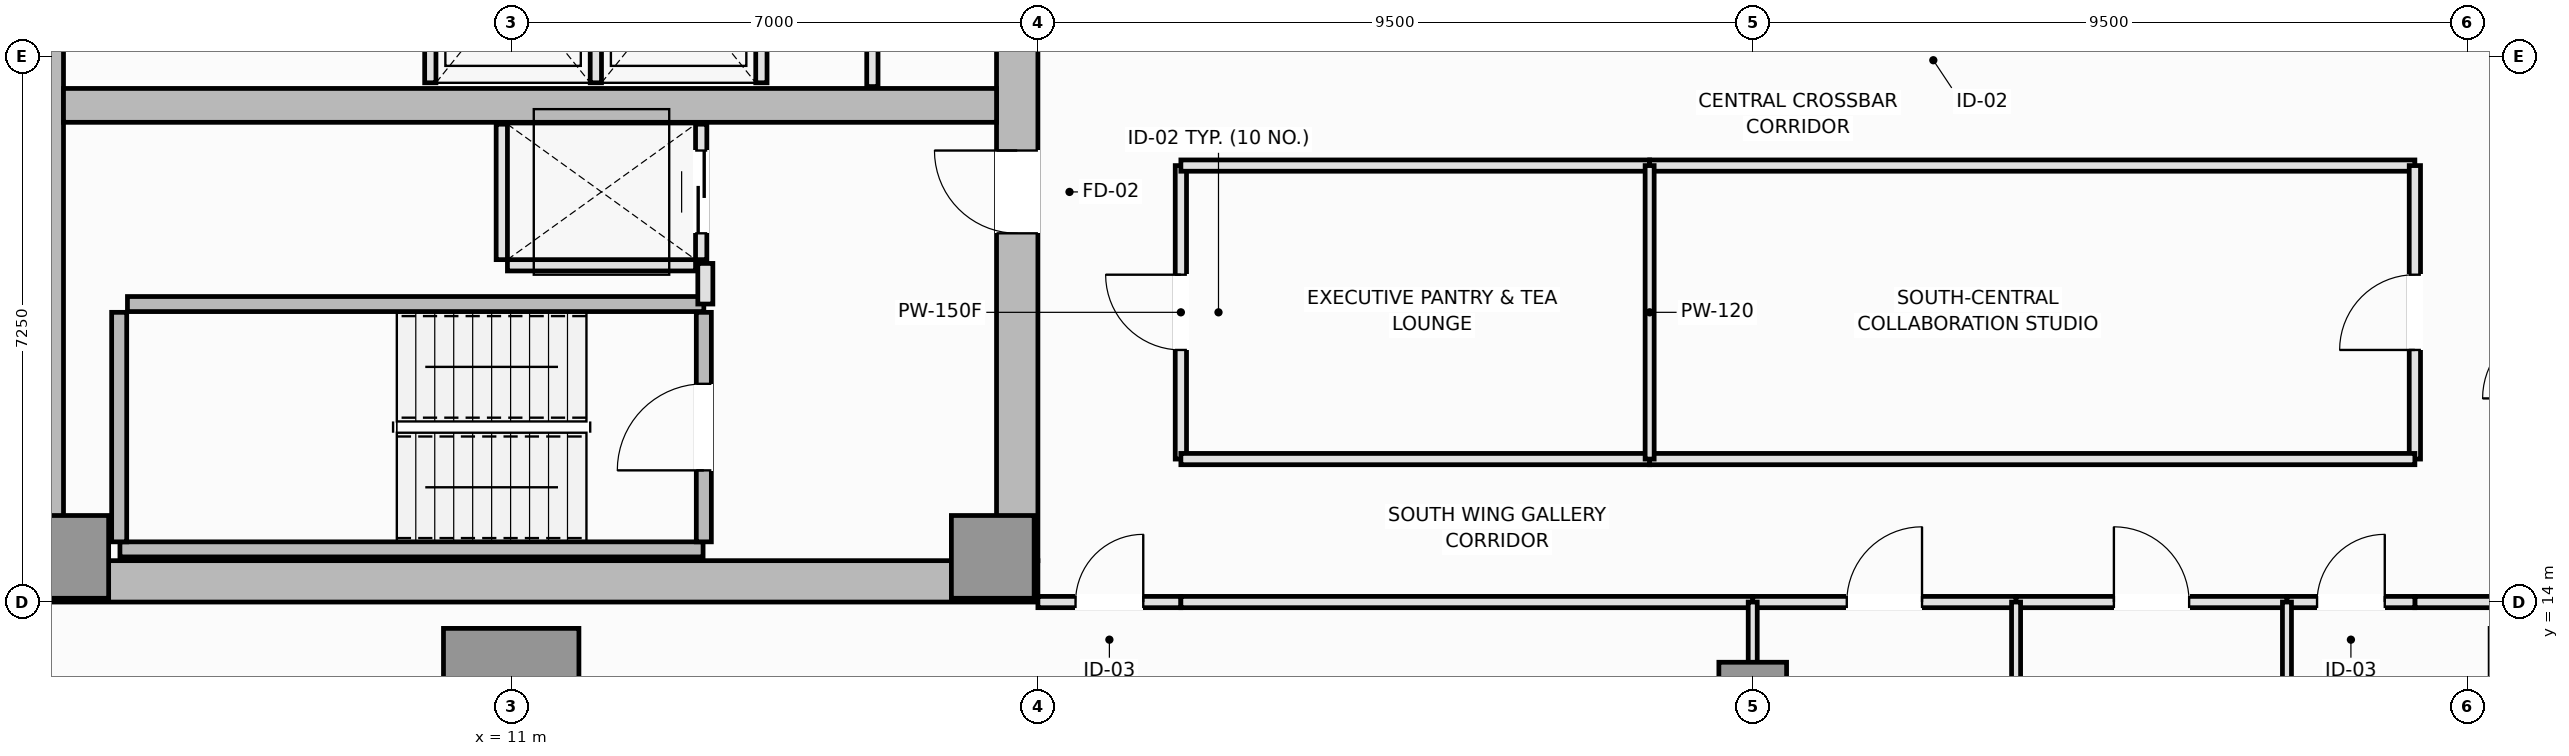
"""IFC4 building model, lengths in metres.
Left out: names, types, materials, properties, quantities, classifications, styles, units other than length and angle.
Written with IfcOpenShell. Run it as: python <this file> out.ifc"""

import sys

from ifc_helpers import new_model, si_unit, direction, frame, frame_2d, origin, origin_2d, place, context, subcontext, project, spatial, rectangle, extrude, element, fill, save


model = new_model("IFC4")
c1 = context("Model", 3, precision=1e-05, world=origin(), true_north=direction((0.0, 1.0)))
c2 = subcontext(c1, "Body", "Model", "MODEL_VIEW")
j1 = project(units=[si_unit("LENGTHUNIT", "METRE"), si_unit("PLANEANGLEUNIT", "RADIAN")], contexts=[c1])
p1 = place(None, origin())
s1 = spatial("IfcSite", under=j1, at=p1, CompositionType="ELEMENT")
p2 = place(p1, origin())
s2 = spatial("IfcBuilding", under=s1, at=p2, CompositionType="ELEMENT")
p3 = place(p2, frame((0.0, 0.0, 223.55)))
s3 = spatial("IfcBuildingStorey", under=s2, at=p3, CompositionType="ELEMENT", Elevation=223.55)
p4 = place(p3, frame((4.5, 14.275, 0.0), z_axis=(0.0, 0.0, 1.0), x_axis=(1.0, 0.0, 0.0)))
e1 = element("IfcWall", 1, at=p4, inside=s3, PredefinedType="SHEAR", context=c2, shape_type="SweptSolid", body=[
    extrude(rectangle(XDim=13.5, YDim=0.55, at=frame_2d((6.75, 0.0))), origin(), (0.0, 0.0, 1.0), 3.55),
])
p5 = place(p3, frame((4.775, 14.55, 0.0), z_axis=(0.0, 0.0, 1.0), x_axis=(0.0, 1.0, 0.0)))
e2 = element("IfcWall", 2, at=p5, inside=s3, PredefinedType="SHEAR", context=c2, shape_type="SweptSolid", body=[
    extrude(rectangle(XDim=21.4, YDim=0.55, at=frame_2d((10.7, 0.0))), origin(), (0.0, 0.0, 1.0), 3.55),
])
p6 = place(p3, frame((17.725, 14.55, 0.0), z_axis=(0.0, 0.0, 1.0), x_axis=(0.0, 1.0, 0.0)))
e3 = element("IfcWall", 3, at=p6, inside=s3, PredefinedType="SHEAR", context=c2, shape_type="SweptSolid", body=[
    extrude(rectangle(XDim=8.9, YDim=0.55, at=frame_2d((4.45, 0.0))), origin(), (0.0, 0.0, 1.0), 3.55),
])
p7 = place(p6, frame((4.35, 0.0, 0.0)))
e4 = element("IfcOpeningElement", 4, at=p7, cuts=e3, PredefinedType="OPENING", context=c2, shape_type="SweptSolid", body=[
    extrude(rectangle(XDim=1.1, YDim=2.15, at=frame_2d((0.55, 1.075))), frame((0.0, 0.285, 0.0), z_axis=(0.0, -1.0, 0.0), x_axis=(1.0, 0.0, 0.0)), (0.0, 0.0, 1.0), 0.57),
])
p8 = place(p3, frame((5.05, 20.6, 0.0), z_axis=(0.0, 0.0, 1.0), x_axis=(1.0, 0.0, 0.0)))
e5 = element("IfcWall", 5, at=p8, inside=s3, PredefinedType="SHEAR", context=c2, shape_type="SweptSolid", body=[
    extrude(rectangle(XDim=12.4, YDim=0.45, at=frame_2d((6.2, 0.0))), origin(), (0.0, 0.0, 1.0), 3.55),
])
for number, where, z_axis, x_axis in (
    (6, (5.1, 14.6, 0.0), (0.0, 0.0, 1.0), (1.0, 0.0, 0.0)),
    (7, (17.4, 14.6, 0.0), (0.0, 0.0, 1.0), (1.0, 0.0, 0.0)),
):
    element("IfcColumn", number, at=place(p3, frame(where, z_axis=z_axis, x_axis=x_axis)), inside=s3, PredefinedType="PILASTER", context=c2, shape_type="SweptSolid", body=[
        extrude(rectangle(XDim=1.1, YDim=1.1, at=origin_2d()), origin(), (0.0, 0.0, 1.0), 3.55),
    ])
p9 = place(p3, frame((11.0, 12.75, 0.0), z_axis=(0.0, 0.0, 1.0), x_axis=(1.0, 0.0, 0.0)))
e8 = element("IfcColumn", 8, at=p9, inside=s3, PredefinedType="COLUMN", context=c2, shape_type="SweptSolid", body=[
    extrude(rectangle(XDim=1.8, YDim=1.8, at=origin_2d()), origin(), (0.0, 0.0, 1.0), 3.55),
])
p10 = place(p3, frame((27.5, 12.75, 0.0), z_axis=(0.0, 0.0, 1.0), x_axis=(1.0, 0.0, 0.0)))
e9 = element("IfcColumn", 9, at=p10, inside=s3, PredefinedType="COLUMN", context=c2, shape_type="SweptSolid", body=[
    extrude(rectangle(XDim=0.9, YDim=0.9, at=origin_2d()), origin(), (0.0, 0.0, 1.0), 3.55),
])
p11 = place(p3, frame((5.8, 14.7, 0.0), z_axis=(0.0, 0.0, 1.0), x_axis=(1.0, 0.0, 0.0)))
e10 = element("IfcWall", 10, at=p11, inside=s3, PredefinedType="SOLIDWALL", context=c2, shape_type="SweptSolid", body=[
    extrude(rectangle(XDim=7.75, YDim=0.2, at=frame_2d((3.875, 0.0))), origin(), (0.0, 0.0, 1.0), 3.55),
])
p12 = place(p3, frame((5.79, 14.8, 0.0), z_axis=(0.0, 0.0, 1.0), x_axis=(0.0, 1.0, 0.0)))
e11 = element("IfcWall", 11, at=p12, inside=s3, PredefinedType="SOLIDWALL", context=c2, shape_type="SweptSolid", body=[
    extrude(rectangle(XDim=3.05, YDim=0.2, at=frame_2d((1.525, 0.0))), origin(), (0.0, 0.0, 1.0), 3.55),
])
p13 = place(p3, frame((5.9, 17.96, 0.0), z_axis=(0.0, 0.0, 1.0), x_axis=(1.0, 0.0, 0.0)))
e12 = element("IfcWall", 12, at=p13, inside=s3, PredefinedType="SOLIDWALL", context=c2, shape_type="SweptSolid", body=[
    extrude(rectangle(XDim=7.66, YDim=0.2, at=frame_2d((3.83, 0.0))), origin(), (0.0, 0.0, 1.0), 3.55),
])
p14 = place(p3, frame((13.56, 14.8, 0.0), z_axis=(0.0, 0.0, 1.0), x_axis=(0.0, 1.0, 0.0)))
e13 = element("IfcWall", 13, at=p14, inside=s3, PredefinedType="SOLIDWALL", context=c2, shape_type="SweptSolid", body=[
    extrude(rectangle(XDim=3.05, YDim=0.2, at=frame_2d((1.525, 0.0))), origin(), (0.0, 0.0, 1.0), 3.55),
])
p15 = place(p14, frame((0.95, 0.0, 0.0)))
e14 = element("IfcOpeningElement", 14, at=p15, cuts=e13, PredefinedType="OPENING", context=c2, shape_type="SweptSolid", body=[
    extrude(rectangle(XDim=1.15, YDim=2.15, at=frame_2d((0.575, 1.075))), frame((0.0, 0.11, 0.0), z_axis=(0.0, -1.0, 0.0), x_axis=(1.0, 0.0, 0.0)), (0.0, 0.0, 1.0), 0.22),
])
for number, where, z_axis, x_axis in (
    (15, (9.925, 20.9, 0.0), (0.0, 0.0, 1.0), (0.0, 1.0, 0.0)),
    (16, (12.125, 20.9, 0.0), (0.0, 0.0, 1.0), (0.0, 1.0, 0.0)),
    (17, (14.325, 20.9, 0.0), (0.0, 0.0, 1.0), (0.0, 1.0, 0.0)),
):
    element("IfcWall", number, at=place(p3, frame(where, z_axis=z_axis, x_axis=x_axis)), inside=s3, PredefinedType="PARTITIONING", context=c2, shape_type="SweptSolid", body=[
        extrude(rectangle(XDim=2.55, YDim=0.15, at=frame_2d((1.275, 0.0))), origin(), (0.0, 0.0, 1.0), 3.37),
    ])
p16 = place(p3, frame((10.95, 18.475, 0.0), z_axis=(0.0, 0.0, 1.0), x_axis=(1.0, 0.0, 0.0)))
e18 = element("IfcWall", 18, at=p16, inside=s3, PredefinedType="PARTITIONING", context=c2, shape_type="SweptSolid", body=[
    extrude(rectangle(XDim=2.5, YDim=0.15, at=frame_2d((1.25, 0.0))), origin(), (0.0, 0.0, 1.0), 3.37),
])
p17 = place(p3, frame((10.875, 18.55, 0.0), z_axis=(0.0, 0.0, 1.0), x_axis=(0.0, 1.0, 0.0)))
e19 = element("IfcWall", 19, at=p17, inside=s3, PredefinedType="PARTITIONING", context=c2, shape_type="SweptSolid", body=[
    extrude(rectangle(XDim=1.8, YDim=0.15, at=frame_2d((0.9, 0.0))), origin(), (0.0, 0.0, 1.0), 3.37),
])
p18 = place(p3, frame((13.525, 18.55, 0.0), z_axis=(0.0, 0.0, 1.0), x_axis=(0.0, 1.0, 0.0)))
e20 = element("IfcWall", 20, at=p18, inside=s3, PredefinedType="PARTITIONING", context=c2, shape_type="SweptSolid", body=[
    extrude(rectangle(XDim=1.8, YDim=0.15, at=frame_2d((0.9, 0.0))), origin(), (0.0, 0.0, 1.0), 3.37),
])
p19 = place(p18, frame((0.35, 0.0, 0.0)))
e21 = element("IfcOpeningElement", 21, at=p19, cuts=e20, PredefinedType="OPENING", context=c2, shape_type="SweptSolid", body=[
    extrude(rectangle(XDim=1.1, YDim=2.2, at=frame_2d((0.55, 1.1))), frame((0.0, 0.085, 0.0), z_axis=(0.0, -1.0, 0.0), x_axis=(1.0, 0.0, 0.0)), (0.0, 0.0, 1.0), 0.17),
])
p20 = place(p3, frame((13.58, 17.96, 0.0), z_axis=(0.0, 0.0, 1.0), x_axis=(0.0, 1.0, 0.0)))
e22 = element("IfcWall", 22, at=p20, inside=s3, PredefinedType="PARTITIONING", context=c2, shape_type="SweptSolid", body=[
    extrude(rectangle(XDim=0.54, YDim=0.2, at=frame_2d((0.27, 0.0))), origin(), (0.0, 0.0, 1.0), 3.37),
])
p21 = place(p3, frame((15.8, 20.85, 0.0), z_axis=(0.0, 0.0, 1.0), x_axis=(0.0, 1.0, 0.0)))
e23 = element("IfcWall", 23, at=p21, inside=s3, PredefinedType="PARTITIONING", context=c2, shape_type="SweptSolid", body=[
    extrude(rectangle(XDim=2.67, YDim=0.15, at=frame_2d((1.335, 0.0))), origin(), (0.0, 0.0, 1.0), 3.37),
])
p22 = place(p3, frame((19.9, 15.9, 0.0), z_axis=(0.0, 0.0, 1.0), x_axis=(0.0, 1.0, 0.0)))
e24 = element("IfcWall", 24, at=p22, inside=s3, PredefinedType="PARTITIONING", context=c2, shape_type="SweptSolid", body=[
    extrude(rectangle(XDim=3.9, YDim=0.15, at=frame_2d((1.95, 0.0))), origin(), (0.0, 0.0, 1.0), 3.37),
])
p23 = place(p22, frame((1.45, 0.0, 0.0)))
e25 = element("IfcOpeningElement", 25, at=p23, cuts=e24, PredefinedType="OPENING", context=c2, shape_type="SweptSolid", body=[
    extrude(rectangle(XDim=1.0, YDim=2.15, at=frame_2d((0.5, 1.075))), frame((0.0, 0.085, 0.0), z_axis=(0.0, -1.0, 0.0), x_axis=(1.0, 0.0, 0.0)), (0.0, 0.0, 1.0), 0.17),
])
p24 = place(p3, frame((18.0, 14.0, 0.0), z_axis=(0.0, 0.0, 1.0), x_axis=(1.0, 0.0, 0.0)))
e26 = element("IfcWall", 26, at=p24, inside=s3, PredefinedType="PARTITIONING", context=c2, shape_type="SweptSolid", body=[
    extrude(rectangle(XDim=1.9, YDim=0.15, at=frame_2d((0.95, 0.0))), origin(), (0.0, 0.0, 1.0), 3.37),
])
p25 = place(p24, frame((0.5, 0.0, 0.0)))
e27 = element("IfcOpeningElement", 27, at=p25, cuts=e26, PredefinedType="OPENING", context=c2, shape_type="SweptSolid", body=[
    extrude(rectangle(XDim=0.9, YDim=2.1, at=frame_2d((0.45, 1.05))), frame((0.0, 0.085, 0.0), z_axis=(0.0, -1.0, 0.0), x_axis=(1.0, 0.0, 0.0)), (0.0, 0.0, 1.0), 0.17),
])
p26 = place(p3, frame((19.9, 19.8, 0.0), z_axis=(0.0, 0.0, 1.0), x_axis=(1.0, 0.0, 0.0)))
e28 = element("IfcWall", 28, at=p26, inside=s3, PredefinedType="PARTITIONING", context=c2, shape_type="SweptSolid", body=[
    extrude(rectangle(XDim=6.23, YDim=0.15, at=frame_2d((3.115, 0.0))), origin(), (0.0, 0.0, 1.0), 3.37),
])
p27 = place(p3, frame((26.13, 19.8, 0.0), z_axis=(0.0, 0.0, 1.0), x_axis=(1.0, 0.0, 0.0)))
e29 = element("IfcWall", 29, at=p27, inside=s3, PredefinedType="PARTITIONING", context=c2, shape_type="SweptSolid", body=[
    extrude(rectangle(XDim=10.17, YDim=0.15, at=frame_2d((5.085, 0.0))), origin(), (0.0, 0.0, 1.0), 3.37),
])
p28 = place(p3, frame((36.3, 15.9, 0.0), z_axis=(0.0, 0.0, 1.0), x_axis=(0.0, 1.0, 0.0)))
e30 = element("IfcWall", 30, at=p28, inside=s3, PredefinedType="PARTITIONING", context=c2, shape_type="SweptSolid", body=[
    extrude(rectangle(XDim=3.9, YDim=0.15, at=frame_2d((1.95, 0.0))), origin(), (0.0, 0.0, 1.0), 3.37),
])
p29 = place(p28, frame((1.45, 0.0, 0.0)))
e31 = element("IfcOpeningElement", 31, at=p29, cuts=e30, PredefinedType="OPENING", context=c2, shape_type="SweptSolid", body=[
    extrude(rectangle(XDim=1.0, YDim=2.15, at=frame_2d((0.5, 1.075))), frame((0.0, 0.085, 0.0), z_axis=(0.0, -1.0, 0.0), x_axis=(1.0, 0.0, 0.0)), (0.0, 0.0, 1.0), 0.17),
])
p30 = place(p3, frame((36.3, 14.0, 0.0), z_axis=(0.0, 0.0, 1.0), x_axis=(1.0, 0.0, 0.0)))
e32 = element("IfcWall", 32, at=p30, inside=s3, PredefinedType="PARTITIONING", context=c2, shape_type="SweptSolid", body=[
    extrude(rectangle(XDim=1.9, YDim=0.15, at=frame_2d((0.95, 0.0))), origin(), (0.0, 0.0, 1.0), 3.37),
])
p31 = place(p3, frame((19.9, 15.9, 0.0), z_axis=(0.0, 0.0, 1.0), x_axis=(1.0, 0.0, 0.0)))
e33 = element("IfcWall", 33, at=p31, inside=s3, PredefinedType="PARTITIONING", context=c2, shape_type="SweptSolid", body=[
    extrude(rectangle(XDim=6.23, YDim=0.15, at=frame_2d((3.115, 0.0))), origin(), (0.0, 0.0, 1.0), 3.37),
])
p32 = place(p3, frame((26.13, 15.9, 0.0), z_axis=(0.0, 0.0, 1.0), x_axis=(1.0, 0.0, 0.0)))
e34 = element("IfcWall", 34, at=p32, inside=s3, PredefinedType="PARTITIONING", context=c2, shape_type="SweptSolid", body=[
    extrude(rectangle(XDim=10.17, YDim=0.15, at=frame_2d((5.085, 0.0))), origin(), (0.0, 0.0, 1.0), 3.37),
])
p33 = place(p3, frame((19.9, 14.0, 0.0), z_axis=(0.0, 0.0, 1.0), x_axis=(1.0, 0.0, 0.0)))
e35 = element("IfcWall", 35, at=p33, inside=s3, PredefinedType="PARTITIONING", context=c2, shape_type="SweptSolid", body=[
    extrude(rectangle(XDim=7.6, YDim=0.15, at=frame_2d((3.8, 0.0))), origin(), (0.0, 0.0, 1.0), 3.37),
])
p34 = place(p3, frame((27.5, 14.0, 0.0), z_axis=(0.0, 0.0, 1.0), x_axis=(1.0, 0.0, 0.0)))
e36 = element("IfcWall", 36, at=p34, inside=s3, PredefinedType="PARTITIONING", context=c2, shape_type="SweptSolid", body=[
    extrude(rectangle(XDim=3.5, YDim=0.15, at=frame_2d((1.75, 0.0))), origin(), (0.0, 0.0, 1.0), 3.37),
])
p35 = place(p34, frame((1.25, 0.0, 0.0)))
e37 = element("IfcOpeningElement", 37, at=p35, cuts=e36, PredefinedType="OPENING", context=c2, shape_type="SweptSolid", body=[
    extrude(rectangle(XDim=1.0, YDim=2.15, at=frame_2d((0.5, 1.075))), frame((0.0, 0.085, 0.0), z_axis=(0.0, -1.0, 0.0), x_axis=(1.0, 0.0, 0.0)), (0.0, 0.0, 1.0), 0.17),
])
p36 = place(p3, frame((31.0, 14.0, 0.0), z_axis=(0.0, 0.0, 1.0), x_axis=(1.0, 0.0, 0.0)))
e38 = element("IfcWall", 38, at=p36, inside=s3, PredefinedType="PARTITIONING", context=c2, shape_type="SweptSolid", body=[
    extrude(rectangle(XDim=3.6, YDim=0.15, at=frame_2d((1.8, 0.0))), origin(), (0.0, 0.0, 1.0), 3.37),
])
p37 = place(p36, frame((1.3, 0.0, 0.0)))
e39 = element("IfcOpeningElement", 39, at=p37, cuts=e38, PredefinedType="OPENING", context=c2, shape_type="SweptSolid", body=[
    extrude(rectangle(XDim=1.0, YDim=2.15, at=frame_2d((0.5, 1.075))), frame((0.0, 0.085, 0.0), z_axis=(0.0, -1.0, 0.0), x_axis=(1.0, 0.0, 0.0)), (0.0, 0.0, 1.0), 0.17),
])
p38 = place(p3, frame((34.6, 14.0, 0.0), z_axis=(0.0, 0.0, 1.0), x_axis=(1.0, 0.0, 0.0)))
e40 = element("IfcWall", 40, at=p38, inside=s3, PredefinedType="PARTITIONING", context=c2, shape_type="SweptSolid", body=[
    extrude(rectangle(XDim=1.7, YDim=0.15, at=frame_2d((0.85, 0.0))), origin(), (0.0, 0.0, 1.0), 3.37),
])
p39 = place(p38, frame((0.4, 0.0, 0.0)))
e41 = element("IfcOpeningElement", 41, at=p39, cuts=e40, PredefinedType="OPENING", context=c2, shape_type="SweptSolid", body=[
    extrude(rectangle(XDim=0.9, YDim=2.1, at=frame_2d((0.45, 1.05))), frame((0.0, 0.085, 0.0), z_axis=(0.0, -1.0, 0.0), x_axis=(1.0, 0.0, 0.0)), (0.0, 0.0, 1.0), 0.17),
])
p40 = place(p3, frame((26.13, 15.9, 0.0), z_axis=(0.0, 0.0, 1.0), x_axis=(0.0, 1.0, 0.0)))
e42 = element("IfcWall", 42, at=p40, inside=s3, PredefinedType="PARTITIONING", context=c2, shape_type="SweptSolid", body=[
    extrude(rectangle(XDim=3.9, YDim=0.12, at=frame_2d((1.95, 0.0))), origin(), (0.0, 0.0, 1.0), 3.37),
])
p41 = place(p3, frame((27.5, 5.01, 0.0), z_axis=(0.0, 0.0, 1.0), x_axis=(0.0, 1.0, 0.0)))
e43 = element("IfcWall", 43, at=p41, inside=s3, PredefinedType="PARTITIONING", context=c2, shape_type="SweptSolid", body=[
    extrude(rectangle(XDim=8.99, YDim=0.12, at=frame_2d((4.495, 0.0))), origin(), (0.0, 0.0, 1.0), 2.92),
])
for number, where, z_axis, x_axis in (
    (44, (31.0, 5.01, 0.0), (0.0, 0.0, 1.0), (0.0, 1.0, 0.0)),
    (45, (34.6, 5.01, 0.0), (0.0, 0.0, 1.0), (0.0, 1.0, 0.0)),
):
    element("IfcWall", number, at=place(p3, frame(where, z_axis=z_axis, x_axis=x_axis)), inside=s3, PredefinedType="PARTITIONING", context=c2, shape_type="SweptSolid", body=[
        extrude(rectangle(XDim=8.99, YDim=0.12, at=frame_2d((4.495, 0.0))), origin(), (0.0, 0.0, 1.0), 3.37),
    ])
p42 = place(p15, origin())
e46 = element("IfcDoor", 46, at=p42, inside=s3, OperationType="SINGLE_SWING_LEFT", PredefinedType="DOOR", context=c2, shape_type="SweptSolid", body=[
    extrude(rectangle(XDim=1.15, YDim=2.15, at=frame_2d((0.575, 1.075))), frame((0.0, 0.025, 0.0), z_axis=(0.0, -1.0, 0.0), x_axis=(1.0, 0.0, 0.0)), (0.0, 0.0, 1.0), 0.05),
])
fill(e14, e46)
p43 = place(p19, origin())
e47 = element("IfcDoor", 47, at=p43, inside=s3, OperationType="DOUBLE_DOOR_SLIDING", PredefinedType="DOOR", context=c2, shape_type="SweptSolid", body=[
    extrude(rectangle(XDim=1.1, YDim=2.2, at=frame_2d((0.55, 1.1))), frame((0.0, 0.025, 0.0), z_axis=(0.0, -1.0, 0.0), x_axis=(1.0, 0.0, 0.0)), (0.0, 0.0, 1.0), 0.05),
])
fill(e21, e47)
p44 = place(p7, origin())
e48 = element("IfcDoor", 48, at=p44, inside=s3, OperationType="SINGLE_SWING_RIGHT", PredefinedType="DOOR", context=c2, shape_type="SweptSolid", body=[
    extrude(rectangle(XDim=1.1, YDim=2.15, at=frame_2d((0.55, 1.075))), frame((0.0, 0.025, 0.0), z_axis=(0.0, -1.0, 0.0), x_axis=(1.0, 0.0, 0.0)), (0.0, 0.0, 1.0), 0.05),
])
fill(e4, e48)
p45 = place(p23, origin())
e49 = element("IfcDoor", 49, at=p45, inside=s3, OperationType="SINGLE_SWING_RIGHT", PredefinedType="DOOR", context=c2, shape_type="SweptSolid", body=[
    extrude(rectangle(XDim=1.0, YDim=2.15, at=frame_2d((0.5, 1.075))), frame((0.0, 0.025, 0.0), z_axis=(0.0, -1.0, 0.0), x_axis=(1.0, 0.0, 0.0)), (0.0, 0.0, 1.0), 0.05),
])
fill(e25, e49)
p46 = place(p25, origin())
e50 = element("IfcDoor", 50, at=p46, inside=s3, OperationType="SINGLE_SWING_RIGHT", PredefinedType="DOOR", context=c2, shape_type="SweptSolid", body=[
    extrude(rectangle(XDim=0.9, YDim=2.1, at=frame_2d((0.45, 1.05))), frame((0.0, 0.025, 0.0), z_axis=(0.0, -1.0, 0.0), x_axis=(1.0, 0.0, 0.0)), (0.0, 0.0, 1.0), 0.05),
])
fill(e27, e50)
p47 = place(p29, origin())
e51 = element("IfcDoor", 51, at=p47, inside=s3, OperationType="SINGLE_SWING_LEFT", PredefinedType="DOOR", context=c2, shape_type="SweptSolid", body=[
    extrude(rectangle(XDim=1.0, YDim=2.15, at=frame_2d((0.5, 1.075))), frame((0.0, 0.025, 0.0), z_axis=(0.0, -1.0, 0.0), x_axis=(1.0, 0.0, 0.0)), (0.0, 0.0, 1.0), 0.05),
])
fill(e31, e51)
p48 = place(p35, origin())
e52 = element("IfcDoor", 52, at=p48, inside=s3, OperationType="SINGLE_SWING_RIGHT", PredefinedType="DOOR", context=c2, shape_type="SweptSolid", body=[
    extrude(rectangle(XDim=1.0, YDim=2.15, at=frame_2d((0.5, 1.075))), frame((0.0, 0.025, 0.0), z_axis=(0.0, -1.0, 0.0), x_axis=(1.0, 0.0, 0.0)), (0.0, 0.0, 1.0), 0.05),
])
fill(e37, e52)
p49 = place(p37, origin())
e53 = element("IfcDoor", 53, at=p49, inside=s3, OperationType="SINGLE_SWING_LEFT", PredefinedType="DOOR", context=c2, shape_type="SweptSolid", body=[
    extrude(rectangle(XDim=1.0, YDim=2.15, at=frame_2d((0.5, 1.075))), frame((0.0, 0.025, 0.0), z_axis=(0.0, -1.0, 0.0), x_axis=(1.0, 0.0, 0.0)), (0.0, 0.0, 1.0), 0.05),
])
fill(e39, e53)
p50 = place(p39, origin())
e54 = element("IfcDoor", 54, at=p50, inside=s3, OperationType="SINGLE_SWING_RIGHT", PredefinedType="DOOR", context=c2, shape_type="SweptSolid", body=[
    extrude(rectangle(XDim=0.9, YDim=2.1, at=frame_2d((0.45, 1.05))), frame((0.0, 0.025, 0.0), z_axis=(0.0, -1.0, 0.0), x_axis=(1.0, 0.0, 0.0)), (0.0, 0.0, 1.0), 0.05),
])
fill(e41, e54)
save(model, sys.argv[1])
